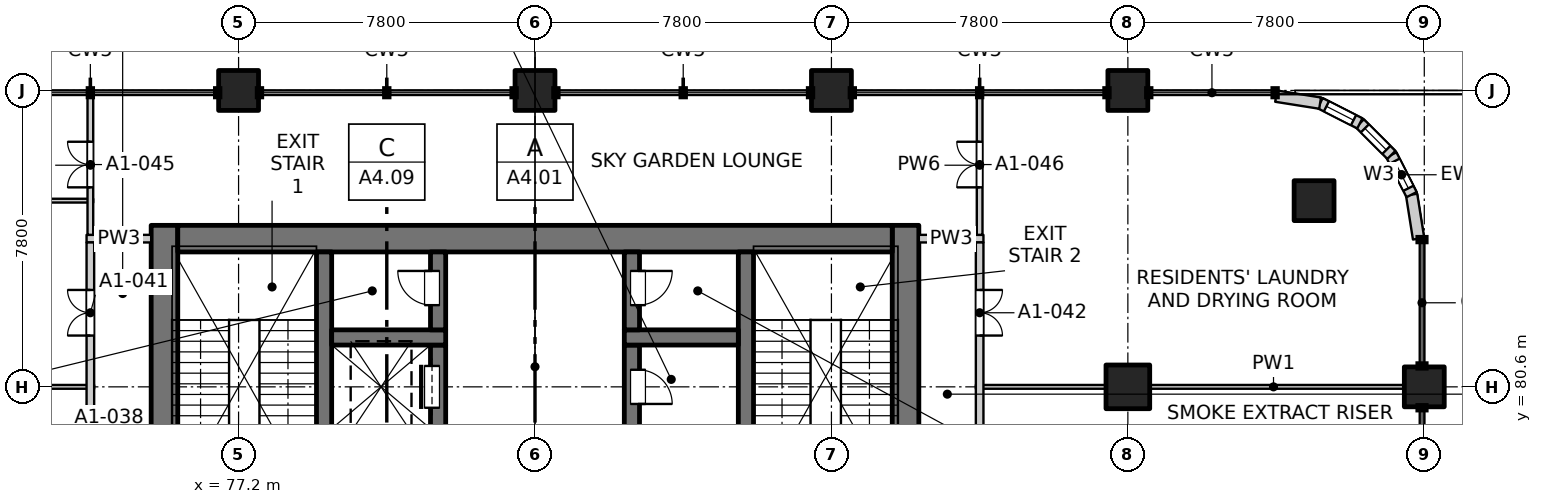
"""IFC4 building model, lengths in metres.
Left out: names, types, materials, properties, quantities, classifications, styles, units other than length and angle.
Written with IfcOpenShell. Run it as: python <this file> out.ifc"""

import sys

from ifc_helpers import new_model, si_unit, direction, frame, frame_2d, origin, origin_2d, place, context, subcontext, project, spatial, rectangle, extrude, element, fill, save


model = new_model("IFC4")
c1 = context("Model", 3, precision=1e-05, world=origin(), true_north=direction((0.0, 1.0)))
c2 = subcontext(c1, "Body", "Model", "MODEL_VIEW")
j1 = project(units=[si_unit("LENGTHUNIT", "METRE"), si_unit("PLANEANGLEUNIT", "RADIAN")], contexts=[c1])
p1 = place(None, origin())
s1 = spatial("IfcSite", under=j1, at=p1, CompositionType="ELEMENT")
p2 = place(p1, origin())
s2 = spatial("IfcBuilding", under=s1, at=p2, CompositionType="ELEMENT")
p3 = place(p2, frame((0.0, 0.0, 15.0)))
s3 = spatial("IfcBuildingStorey", under=s2, at=p3, CompositionType="ELEMENT", Elevation=15.0)
for number, where, z_axis, x_axis in (
    (1, (105.5, 85.5, -0.35), (0.0, 0.0, 1.0), (1.0, 0.0, 0.0)),
    (2, (77.2, 88.4, -0.35), (0.0, 0.0, 1.0), (1.0, 0.0, 0.0)),
    (3, (85.0, 88.4, -0.35), (0.0, 0.0, 1.0), (1.0, 0.0, 0.0)),
    (4, (92.8, 88.4, -0.35), (0.0, 0.0, 1.0), (1.0, 0.0, 0.0)),
    (5, (108.4, 80.6, -0.35), (0.0, 0.0, 1.0), (1.0, 0.0, 0.0)),
    (6, (100.6, 88.4, -0.35), (0.0, 0.0, 1.0), (1.0, 0.0, 0.0)),
):
    element("IfcColumn", number, at=place(p3, frame(where, z_axis=z_axis, x_axis=x_axis)), inside=s3, PredefinedType="COLUMN", context=c2, shape_type="SweptSolid", body=[
        extrude(rectangle(XDim=1.05, YDim=1.05, at=origin_2d()), origin(), (0.0, 0.0, 1.0), 4.6),
    ])
p4 = place(p3, frame((100.6, 80.6, -0.35), z_axis=(0.0, 0.0, 1.0), x_axis=(1.0, 0.0, 0.0)))
e7 = element("IfcColumn", 7, at=p4, inside=s3, PredefinedType="COLUMN", context=c2, shape_type="SweptSolid", body=[
    extrude(rectangle(XDim=1.15, YDim=1.15, at=origin_2d()), origin(), (0.0, 0.0, 1.0), 4.6),
])
p5 = place(p3, frame((75.25, 77.3, -0.35), z_axis=(0.0, 0.0, 1.0), x_axis=(0.0, 1.0, 0.0)))
e8 = element("IfcWall", 8, at=p5, inside=s3, PredefinedType="SOLIDWALL", context=c2, shape_type="SweptSolid", body=[
    extrude(rectangle(XDim=7.55, YDim=0.7, at=frame_2d((3.775, 0.0))), origin(), (0.0, 0.0, 1.0), 4.6),
])
p6 = place(p5, frame((0.3, 0.0, 0.35)))
e9 = element("IfcOpeningElement", 9, at=p6, cuts=e8, PredefinedType="OPENING", context=c2, shape_type="SweptSolid", body=[
    extrude(rectangle(XDim=1.2, YDim=2.1, at=frame_2d((0.6, 1.05))), frame((0.0, 0.36, 0.0), z_axis=(0.0, -1.0, 0.0), x_axis=(1.0, 0.0, 0.0)), (0.0, 0.0, 1.0), 0.72),
])
p7 = place(p3, frame((94.75, 77.3, -0.35), z_axis=(0.0, 0.0, 1.0), x_axis=(0.0, 1.0, 0.0)))
e10 = element("IfcWall", 10, at=p7, inside=s3, PredefinedType="SOLIDWALL", context=c2, shape_type="SweptSolid", body=[
    extrude(rectangle(XDim=7.55, YDim=0.7, at=frame_2d((3.775, 0.0))), origin(), (0.0, 0.0, 1.0), 4.6),
])
p8 = place(p7, frame((0.3, 0.0, 0.35)))
e11 = element("IfcOpeningElement", 11, at=p8, cuts=e10, PredefinedType="OPENING", context=c2, shape_type="SweptSolid", body=[
    extrude(rectangle(XDim=1.2, YDim=2.1, at=frame_2d((0.6, 1.05))), frame((0.0, 0.36, 0.0), z_axis=(0.0, -1.0, 0.0), x_axis=(1.0, 0.0, 0.0)), (0.0, 0.0, 1.0), 0.72),
])
p9 = place(p3, frame((75.6, 84.5, -0.35), z_axis=(0.0, 0.0, 1.0), x_axis=(1.0, 0.0, 0.0)))
e12 = element("IfcWall", 12, at=p9, inside=s3, PredefinedType="SOLIDWALL", context=c2, shape_type="SweptSolid", body=[
    extrude(rectangle(XDim=18.8, YDim=0.7, at=frame_2d((9.4, 0.0))), origin(), (0.0, 0.0, 1.0), 4.6),
])
for number, where, z_axis, x_axis in (
    (13, (79.45, 77.3, -0.35), (0.0, 0.0, 1.0), (0.0, 1.0, 0.0)),
    (14, (90.55, 77.3, -0.35), (0.0, 0.0, 1.0), (0.0, 1.0, 0.0)),
):
    element("IfcWall", number, at=place(p3, frame(where, z_axis=z_axis, x_axis=x_axis)), inside=s3, PredefinedType="SOLIDWALL", context=c2, shape_type="SweptSolid", body=[
        extrude(rectangle(XDim=6.85, YDim=0.4, at=frame_2d((3.425, 0.0))), origin(), (0.0, 0.0, 1.0), 4.6),
    ])
p10 = place(p3, frame((82.45, 79.5, -0.35), z_axis=(0.0, 0.0, 1.0), x_axis=(0.0, 1.0, 0.0)))
e15 = element("IfcWall", 15, at=p10, inside=s3, PredefinedType="SOLIDWALL", context=c2, shape_type="SweptSolid", body=[
    extrude(rectangle(XDim=2.2, YDim=0.4, at=frame_2d((1.1, 0.0))), origin(), (0.0, 0.0, 1.0), 4.6),
])
p11 = place(p10, frame((0.55, 0.0, 0.35)))
e16 = element("IfcOpeningElement", 16, at=p11, cuts=e15, PredefinedType="OPENING", context=c2, shape_type="SweptSolid", body=[
    extrude(rectangle(XDim=1.1, YDim=2.1, at=frame_2d((0.55, 1.05))), frame((0.0, 0.21, 0.0), z_axis=(0.0, -1.0, 0.0), x_axis=(1.0, 0.0, 0.0)), (0.0, 0.0, 1.0), 0.42),
])
p12 = place(p3, frame((79.65, 81.9, -0.35), z_axis=(0.0, 0.0, 1.0), x_axis=(1.0, 0.0, 0.0)))
e17 = element("IfcWall", 17, at=p12, inside=s3, PredefinedType="SOLIDWALL", context=c2, shape_type="SweptSolid", body=[
    extrude(rectangle(XDim=3.0, YDim=0.4, at=frame_2d((1.5, 0.0))), origin(), (0.0, 0.0, 1.0), 4.6),
])
p13 = place(p3, frame((82.45, 82.1, -0.35), z_axis=(0.0, 0.0, 1.0), x_axis=(0.0, 1.0, 0.0)))
e18 = element("IfcWall", 18, at=p13, inside=s3, PredefinedType="SOLIDWALL", context=c2, shape_type="SweptSolid", body=[
    extrude(rectangle(XDim=2.05, YDim=0.4, at=frame_2d((1.025, 0.0))), origin(), (0.0, 0.0, 1.0), 4.6),
])
p14 = place(p13, frame((0.65, 0.0, 0.35)))
e19 = element("IfcOpeningElement", 19, at=p14, cuts=e18, PredefinedType="OPENING", context=c2, shape_type="SweptSolid", body=[
    extrude(rectangle(XDim=0.9, YDim=2.1, at=frame_2d((0.45, 1.05))), frame((0.0, 0.21, 0.0), z_axis=(0.0, -1.0, 0.0), x_axis=(1.0, 0.0, 0.0)), (0.0, 0.0, 1.0), 0.42),
])
p15 = place(p3, frame((87.55, 79.5, -0.35), z_axis=(0.0, 0.0, 1.0), x_axis=(0.0, 1.0, 0.0)))
e20 = element("IfcWall", 20, at=p15, inside=s3, PredefinedType="SOLIDWALL", context=c2, shape_type="SweptSolid", body=[
    extrude(rectangle(XDim=2.2, YDim=0.4, at=frame_2d((1.1, 0.0))), origin(), (0.0, 0.0, 1.0), 4.6),
])
p16 = place(p15, frame((0.65, 0.0, 0.35)))
e21 = element("IfcOpeningElement", 21, at=p16, cuts=e20, PredefinedType="OPENING", context=c2, shape_type="SweptSolid", body=[
    extrude(rectangle(XDim=0.9, YDim=2.1, at=frame_2d((0.45, 1.05))), frame((0.0, 0.21, 0.0), z_axis=(0.0, -1.0, 0.0), x_axis=(1.0, 0.0, 0.0)), (0.0, 0.0, 1.0), 0.42),
])
p17 = place(p3, frame((87.35, 81.9, -0.35), z_axis=(0.0, 0.0, 1.0), x_axis=(1.0, 0.0, 0.0)))
e22 = element("IfcWall", 22, at=p17, inside=s3, PredefinedType="SOLIDWALL", context=c2, shape_type="SweptSolid", body=[
    extrude(rectangle(XDim=3.0, YDim=0.4, at=frame_2d((1.5, 0.0))), origin(), (0.0, 0.0, 1.0), 4.6),
])
p18 = place(p3, frame((87.55, 82.1, -0.35), z_axis=(0.0, 0.0, 1.0), x_axis=(0.0, 1.0, 0.0)))
e23 = element("IfcWall", 23, at=p18, inside=s3, PredefinedType="SOLIDWALL", context=c2, shape_type="SweptSolid", body=[
    extrude(rectangle(XDim=2.05, YDim=0.4, at=frame_2d((1.025, 0.0))), origin(), (0.0, 0.0, 1.0), 4.6),
])
p19 = place(p18, frame((0.65, 0.0, 0.35)))
e24 = element("IfcOpeningElement", 24, at=p19, cuts=e23, PredefinedType="OPENING", context=c2, shape_type="SweptSolid", body=[
    extrude(rectangle(XDim=0.9, YDim=2.1, at=frame_2d((0.45, 1.05))), frame((0.0, 0.21, 0.0), z_axis=(0.0, -1.0, 0.0), x_axis=(1.0, 0.0, 0.0)), (0.0, 0.0, 1.0), 0.42),
])
p20 = place(p3, frame((108.25, 84.5, 0.0), z_axis=(0.0, 0.0, 1.0), x_axis=(-0.156496880861, 0.987678452879, 0.0)))
e25 = element("IfcWall", 25, at=p20, inside=s3, PredefinedType="SOLIDWALL", context=c2, shape_type="SweptSolid", body=[
    extrude(rectangle(XDim=1.173, YDim=0.3, at=frame_2d((0.586, 0.0))), origin(), (0.0, 0.0, 1.0), 3.8),
])
p21 = place(p3, frame((108.066, 85.659, 0.0), z_axis=(0.0, 0.0, 1.0), x_axis=(-0.454025524128, 0.890988677504, 0.0)))
e26 = element("IfcWall", 26, at=p21, inside=s3, PredefinedType="SOLIDWALL", context=c2, shape_type="SweptSolid", body=[
    extrude(rectangle(XDim=1.173, YDim=0.3, at=frame_2d((0.587, 0.0))), origin(), (0.0, 0.0, 1.0), 3.8),
])
p22 = place(p21, frame((0.187, 0.0, 0.9)))
e27 = element("IfcOpeningElement", 27, at=p22, cuts=e26, PredefinedType="OPENING", context=c2, shape_type="SweptSolid", body=[
    extrude(rectangle(XDim=0.8, YDim=1.2, at=frame_2d((0.4, 0.6))), frame((0.0, 0.16, 0.0), z_axis=(0.0, -1.0, 0.0), x_axis=(1.0, 0.0, 0.0)), (0.0, 0.0, 1.0), 0.32),
])
p23 = place(p3, frame((107.534, 86.704, 0.0), z_axis=(0.0, 0.0, 1.0), x_axis=(-0.707106781187, 0.707106781187, 0.0)))
e28 = element("IfcWall", 28, at=p23, inside=s3, PredefinedType="SOLIDWALL", context=c2, shape_type="SweptSolid", body=[
    extrude(rectangle(XDim=1.173, YDim=0.3, at=frame_2d((0.586, 0.0))), origin(), (0.0, 0.0, 1.0), 3.8),
])
p24 = place(p23, frame((0.187, 0.0, 0.9)))
e29 = element("IfcOpeningElement", 29, at=p24, cuts=e28, PredefinedType="OPENING", context=c2, shape_type="SweptSolid", body=[
    extrude(rectangle(XDim=0.8, YDim=1.2, at=frame_2d((0.4, 0.6))), frame((0.0, 0.16, 0.0), z_axis=(0.0, -1.0, 0.0), x_axis=(1.0, 0.0, 0.0)), (0.0, 0.0, 1.0), 0.32),
])
p25 = place(p3, frame((106.704, 87.534, 0.0), z_axis=(0.0, 0.0, 1.0), x_axis=(-0.890988677504, 0.454025524128, 0.0)))
e30 = element("IfcWall", 30, at=p25, inside=s3, PredefinedType="SOLIDWALL", context=c2, shape_type="SweptSolid", body=[
    extrude(rectangle(XDim=1.173, YDim=0.3, at=frame_2d((0.587, 0.0))), origin(), (0.0, 0.0, 1.0), 3.8),
])
p26 = place(p25, frame((0.187, 0.0, 0.9)))
e31 = element("IfcOpeningElement", 31, at=p26, cuts=e30, PredefinedType="OPENING", context=c2, shape_type="SweptSolid", body=[
    extrude(rectangle(XDim=0.8, YDim=1.2, at=frame_2d((0.4, 0.6))), frame((0.0, 0.16, 0.0), z_axis=(0.0, -1.0, 0.0), x_axis=(1.0, 0.0, 0.0)), (0.0, 0.0, 1.0), 0.32),
])
p27 = place(p3, frame((105.659, 88.066, 0.0), z_axis=(0.0, 0.0, 1.0), x_axis=(-0.987678452879, 0.156496880861, 0.0)))
e32 = element("IfcWall", 32, at=p27, inside=s3, PredefinedType="SOLIDWALL", context=c2, shape_type="SweptSolid", body=[
    extrude(rectangle(XDim=1.173, YDim=0.3, at=frame_2d((0.586, 0.0))), origin(), (0.0, 0.0, 1.0), 3.8),
])
p28 = place(p3, frame((69.4, 80.6, 0.0), z_axis=(0.0, 0.0, 1.0), x_axis=(1.0, 0.0, 0.0)))
e33 = element("IfcWall", 33, at=p28, inside=s3, PredefinedType="PARTITIONING", context=c2, shape_type="SweptSolid", body=[
    extrude(rectangle(XDim=4.0, YDim=0.1, at=frame_2d((2.0, 0.0))), origin(), (0.0, 0.0, 1.0), 4.25),
])
p29 = place(p3, frame((96.6, 80.6, 0.0), z_axis=(0.0, 0.0, 1.0), x_axis=(1.0, 0.0, 0.0)))
e34 = element("IfcWall", 34, at=p29, inside=s3, PredefinedType="PARTITIONING", context=c2, shape_type="SweptSolid", body=[
    extrude(rectangle(XDim=4.0, YDim=0.1, at=frame_2d((2.0, 0.0))), origin(), (0.0, 0.0, 1.0), 4.25),
])
p30 = place(p3, frame((100.6, 80.6, 0.0), z_axis=(0.0, 0.0, 1.0), x_axis=(1.0, 0.0, 0.0)))
e35 = element("IfcWall", 35, at=p30, inside=s3, PredefinedType="PARTITIONING", context=c2, shape_type="SweptSolid", body=[
    extrude(rectangle(XDim=7.665, YDim=0.1, at=frame_2d((3.833, 0.0))), origin(), (0.0, 0.0, 1.0), 3.65),
])
for number, where, z_axis, x_axis in (
    (36, (73.2, 84.5, 0.0), (0.0, 0.0, 1.0), (1.0, 0.0, 0.0)),
    (37, (95.1, 84.5, 0.0), (0.0, 0.0, 1.0), (1.0, 0.0, 0.0)),
):
    element("IfcWall", number, at=place(p3, frame(where, z_axis=z_axis, x_axis=x_axis)), inside=s3, PredefinedType="PARTITIONING", context=c2, shape_type="SweptSolid", body=[
        extrude(rectangle(XDim=1.7, YDim=0.2, at=frame_2d((0.85, 0.0))), origin(), (0.0, 0.0, 1.0), 4.25),
    ])
p31 = place(p3, frame((62.51, 85.5, 0.0), z_axis=(0.0, 0.0, 1.0), x_axis=(1.0, 0.0, 0.0)))
e38 = element("IfcWall", 38, at=p31, inside=s3, PredefinedType="PARTITIONING", context=c2, shape_type="SweptSolid", body=[
    extrude(rectangle(XDim=10.865, YDim=0.1, at=frame_2d((5.433, 0.0))), origin(), (0.0, 0.0, 1.0), 4.25),
])
p32 = place(p3, frame((73.3, 49.5, 0.0), z_axis=(0.0, 0.0, 1.0), x_axis=(0.0, 1.0, 0.0)))
e39 = element("IfcWall", 39, at=p32, inside=s3, PredefinedType="PARTITIONING", context=c2, shape_type="SweptSolid", body=[
    extrude(rectangle(XDim=34.9, YDim=0.2, at=frame_2d((17.45, 0.0))), origin(), (0.0, 0.0, 1.0), 4.25),
])
p33 = place(p32, frame((6.2, 0.0, 0.0)))
e40 = element("IfcOpeningElement", 40, at=p33, cuts=e39, PredefinedType="OPENING", context=c2, shape_type="SweptSolid", body=[
    extrude(rectangle(XDim=1.2, YDim=2.1, at=frame_2d((0.6, 1.05))), frame((0.0, 0.11, 0.0), z_axis=(0.0, -1.0, 0.0), x_axis=(1.0, 0.0, 0.0)), (0.0, 0.0, 1.0), 0.22),
])
p34 = place(p32, frame((9.05, 0.0, 0.0)))
e41 = element("IfcOpeningElement", 41, at=p34, cuts=e39, PredefinedType="OPENING", context=c2, shape_type="SweptSolid", body=[
    extrude(rectangle(XDim=1.2, YDim=2.1, at=frame_2d((0.6, 1.05))), frame((0.0, 0.11, 0.0), z_axis=(0.0, -1.0, 0.0), x_axis=(1.0, 0.0, 0.0)), (0.0, 0.0, 1.0), 0.22),
])
p35 = place(p32, frame((28.55, 0.0, 0.0)))
e42 = element("IfcOpeningElement", 42, at=p35, cuts=e39, PredefinedType="OPENING", context=c2, shape_type="SweptSolid", body=[
    extrude(rectangle(XDim=1.2, YDim=2.1, at=frame_2d((0.6, 1.05))), frame((0.0, 0.11, 0.0), z_axis=(0.0, -1.0, 0.0), x_axis=(1.0, 0.0, 0.0)), (0.0, 0.0, 1.0), 0.22),
])
p36 = place(p32, frame((32.45, 0.0, 0.0)))
e43 = element("IfcOpeningElement", 43, at=p36, cuts=e39, PredefinedType="OPENING", context=c2, shape_type="SweptSolid", body=[
    extrude(rectangle(XDim=1.2, YDim=2.1, at=frame_2d((0.6, 1.05))), frame((0.0, 0.11, 0.0), z_axis=(0.0, -1.0, 0.0), x_axis=(1.0, 0.0, 0.0)), (0.0, 0.0, 1.0), 0.22),
])
p37 = place(p3, frame((73.3, 84.6, 0.0), z_axis=(0.0, 0.0, 1.0), x_axis=(0.0, 1.0, 0.0)))
e44 = element("IfcWall", 44, at=p37, inside=s3, PredefinedType="PARTITIONING", context=c2, shape_type="SweptSolid", body=[
    extrude(rectangle(XDim=3.665, YDim=0.15, at=frame_2d((1.833, 0.0))), origin(), (0.0, 0.0, 1.0), 4.25),
])
p38 = place(p37, frame((1.25, 0.0, 0.0)))
e45 = element("IfcOpeningElement", 45, at=p38, cuts=e44, PredefinedType="OPENING", context=c2, shape_type="SweptSolid", body=[
    extrude(rectangle(XDim=1.2, YDim=2.1, at=frame_2d((0.6, 1.05))), frame((0.0, 0.085, 0.0), z_axis=(0.0, -1.0, 0.0), x_axis=(1.0, 0.0, 0.0)), (0.0, 0.0, 1.0), 0.17),
])
p39 = place(p3, frame((96.7, 49.5, 0.0), z_axis=(0.0, 0.0, 1.0), x_axis=(0.0, 1.0, 0.0)))
e46 = element("IfcWall", 46, at=p39, inside=s3, PredefinedType="PARTITIONING", context=c2, shape_type="SweptSolid", body=[
    extrude(rectangle(XDim=34.9, YDim=0.2, at=frame_2d((17.45, 0.0))), origin(), (0.0, 0.0, 1.0), 4.25),
])
p40 = place(p39, frame((6.2, 0.0, 0.0)))
e47 = element("IfcOpeningElement", 47, at=p40, cuts=e46, PredefinedType="OPENING", context=c2, shape_type="SweptSolid", body=[
    extrude(rectangle(XDim=1.2, YDim=2.1, at=frame_2d((0.6, 1.05))), frame((0.0, 0.11, 0.0), z_axis=(0.0, -1.0, 0.0), x_axis=(1.0, 0.0, 0.0)), (0.0, 0.0, 1.0), 0.22),
])
p41 = place(p39, frame((12.95, 0.0, 0.0)))
e48 = element("IfcOpeningElement", 48, at=p41, cuts=e46, PredefinedType="OPENING", context=c2, shape_type="SweptSolid", body=[
    extrude(rectangle(XDim=1.2, YDim=2.1, at=frame_2d((0.6, 1.05))), frame((0.0, 0.11, 0.0), z_axis=(0.0, -1.0, 0.0), x_axis=(1.0, 0.0, 0.0)), (0.0, 0.0, 1.0), 0.22),
])
p42 = place(p39, frame((16.85, 0.0, 0.0)))
e49 = element("IfcOpeningElement", 49, at=p42, cuts=e46, PredefinedType="OPENING", context=c2, shape_type="SweptSolid", body=[
    extrude(rectangle(XDim=1.2, YDim=2.1, at=frame_2d((0.6, 1.05))), frame((0.0, 0.11, 0.0), z_axis=(0.0, -1.0, 0.0), x_axis=(1.0, 0.0, 0.0)), (0.0, 0.0, 1.0), 0.22),
])
p43 = place(p39, frame((32.45, 0.0, 0.0)))
e50 = element("IfcOpeningElement", 50, at=p43, cuts=e46, PredefinedType="OPENING", context=c2, shape_type="SweptSolid", body=[
    extrude(rectangle(XDim=1.2, YDim=2.1, at=frame_2d((0.6, 1.05))), frame((0.0, 0.11, 0.0), z_axis=(0.0, -1.0, 0.0), x_axis=(1.0, 0.0, 0.0)), (0.0, 0.0, 1.0), 0.22),
])
p44 = place(p3, frame((96.7, 84.6, 0.0), z_axis=(0.0, 0.0, 1.0), x_axis=(0.0, 1.0, 0.0)))
e51 = element("IfcWall", 51, at=p44, inside=s3, PredefinedType="PARTITIONING", context=c2, shape_type="SweptSolid", body=[
    extrude(rectangle(XDim=3.665, YDim=0.15, at=frame_2d((1.833, 0.0))), origin(), (0.0, 0.0, 1.0), 4.25),
])
p45 = place(p44, frame((1.25, 0.0, 0.0)))
e52 = element("IfcOpeningElement", 52, at=p45, cuts=e51, PredefinedType="OPENING", context=c2, shape_type="SweptSolid", body=[
    extrude(rectangle(XDim=1.2, YDim=2.1, at=frame_2d((0.6, 1.05))), frame((0.0, 0.085, 0.0), z_axis=(0.0, -1.0, 0.0), x_axis=(1.0, 0.0, 0.0)), (0.0, 0.0, 1.0), 0.17),
])
p46 = place(p22, origin())
e53 = element("IfcWindow", 53, at=p46, inside=s3, PartitioningType="SINGLE_PANEL", PredefinedType="WINDOW", context=c2, shape_type="SweptSolid", body=[
    extrude(rectangle(XDim=0.8, YDim=1.2, at=frame_2d((0.4, 0.6))), frame((0.0, 0.03, 0.0), z_axis=(0.0, -1.0, 0.0), x_axis=(1.0, 0.0, 0.0)), (0.0, 0.0, 1.0), 0.06),
])
fill(e27, e53)
p47 = place(p24, origin())
e54 = element("IfcWindow", 54, at=p47, inside=s3, PartitioningType="SINGLE_PANEL", PredefinedType="WINDOW", context=c2, shape_type="SweptSolid", body=[
    extrude(rectangle(XDim=0.8, YDim=1.2, at=frame_2d((0.4, 0.6))), frame((0.0, 0.03, 0.0), z_axis=(0.0, -1.0, 0.0), x_axis=(1.0, 0.0, 0.0)), (0.0, 0.0, 1.0), 0.06),
])
fill(e29, e54)
p48 = place(p26, origin())
e55 = element("IfcWindow", 55, at=p48, inside=s3, PartitioningType="SINGLE_PANEL", PredefinedType="WINDOW", context=c2, shape_type="SweptSolid", body=[
    extrude(rectangle(XDim=0.8, YDim=1.2, at=frame_2d((0.4, 0.6))), frame((0.0, 0.03, 0.0), z_axis=(0.0, -1.0, 0.0), x_axis=(1.0, 0.0, 0.0)), (0.0, 0.0, 1.0), 0.06),
])
fill(e31, e55)
p49 = place(p11, origin())
e56 = element("IfcDoor", 56, at=p49, inside=s3, OperationType="SLIDING_TO_LEFT", PredefinedType="DOOR", context=c2, shape_type="SweptSolid", body=[
    extrude(rectangle(XDim=1.1, YDim=2.1, at=frame_2d((0.55, 1.05))), frame((0.0, 0.185, 0.0), z_axis=(0.0, -1.0, 0.0), x_axis=(1.0, 0.0, 0.0)), (0.0, 0.0, 1.0), 0.05),
])
fill(e16, e56)
p50 = place(p16, origin())
e57 = element("IfcDoor", 57, at=p50, inside=s3, OperationType="SINGLE_SWING_RIGHT", PredefinedType="DOOR", context=c2, shape_type="SweptSolid", body=[
    extrude(rectangle(XDim=0.9, YDim=2.1, at=frame_2d((0.45, 1.05))), frame((0.0, -0.135, 0.0), z_axis=(0.0, -1.0, 0.0), x_axis=(1.0, 0.0, 0.0)), (0.0, 0.0, 1.0), 0.05),
])
fill(e21, e57)
p51 = place(p36, origin())
e58 = element("IfcDoor", 58, at=p51, inside=s3, OperationType="DOUBLE_DOOR_SINGLE_SWING", PredefinedType="DOOR", context=c2, shape_type="SweptSolid", body=[
    extrude(rectangle(XDim=1.2, YDim=2.1, at=frame_2d((0.6, 1.05))), frame((0.0, 0.025, 0.0), z_axis=(0.0, -1.0, 0.0), x_axis=(1.0, 0.0, 0.0)), (0.0, 0.0, 1.0), 0.05),
])
fill(e43, e58)
p52 = place(p43, origin())
e59 = element("IfcDoor", 59, at=p52, inside=s3, OperationType="DOUBLE_DOOR_SINGLE_SWING", PredefinedType="DOOR", context=c2, shape_type="SweptSolid", body=[
    extrude(rectangle(XDim=1.2, YDim=2.1, at=frame_2d((0.6, 1.05))), frame((0.0, 0.025, 0.0), z_axis=(0.0, -1.0, 0.0), x_axis=(1.0, 0.0, 0.0)), (0.0, 0.0, 1.0), 0.05),
])
fill(e50, e59)
p53 = place(p14, origin())
e60 = element("IfcDoor", 60, at=p53, inside=s3, OperationType="SINGLE_SWING_RIGHT", PredefinedType="DOOR", context=c2, shape_type="SweptSolid", body=[
    extrude(rectangle(XDim=0.9, YDim=2.1, at=frame_2d((0.45, 1.05))), frame((0.0, 0.185, 0.0), z_axis=(0.0, -1.0, 0.0), x_axis=(1.0, 0.0, 0.0)), (0.0, 0.0, 1.0), 0.05),
])
fill(e19, e60)
p54 = place(p19, origin())
e61 = element("IfcDoor", 61, at=p54, inside=s3, OperationType="SINGLE_SWING_LEFT", PredefinedType="DOOR", context=c2, shape_type="SweptSolid", body=[
    extrude(rectangle(XDim=0.9, YDim=2.1, at=frame_2d((0.45, 1.05))), frame((0.0, -0.135, 0.0), z_axis=(0.0, -1.0, 0.0), x_axis=(1.0, 0.0, 0.0)), (0.0, 0.0, 1.0), 0.05),
])
fill(e24, e61)
p55 = place(p38, origin())
e62 = element("IfcDoor", 62, at=p55, inside=s3, OperationType="DOUBLE_DOOR_SINGLE_SWING", PredefinedType="DOOR", context=c2, shape_type="SweptSolid", body=[
    extrude(rectangle(XDim=1.2, YDim=2.1, at=frame_2d((0.6, 1.05))), frame((0.0, 0.025, 0.0), z_axis=(0.0, -1.0, 0.0), x_axis=(1.0, 0.0, 0.0)), (0.0, 0.0, 1.0), 0.05),
])
fill(e45, e62)
p56 = place(p45, origin())
e63 = element("IfcDoor", 63, at=p56, inside=s3, OperationType="DOUBLE_DOOR_SINGLE_SWING", PredefinedType="DOOR", context=c2, shape_type="SweptSolid", body=[
    extrude(rectangle(XDim=1.2, YDim=2.1, at=frame_2d((0.6, 1.05))), frame((0.0, 0.025, 0.0), z_axis=(0.0, -1.0, 0.0), x_axis=(1.0, 0.0, 0.0)), (0.0, 0.0, 1.0), 0.05),
])
fill(e52, e63)
save(model, sys.argv[1])
